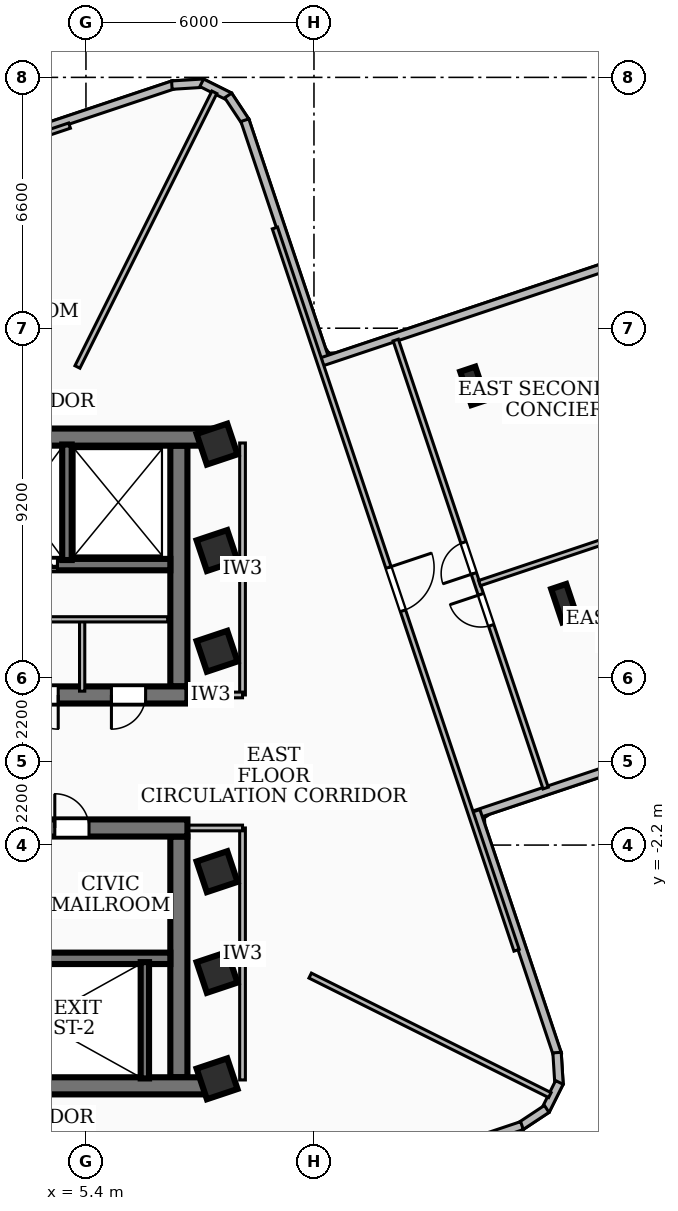
"""IFC4 building model, lengths in metres.
Left out: names, types, materials, properties, quantities, classifications, styles, units other than length and angle.
Written with IfcOpenShell. Run it as: python <this file> out.ifc"""

import sys

from ifc_helpers import new_model, si_unit, direction, frame, frame_2d, origin, origin_2d, place, context, subcontext, project, spatial, rectangle, i_section, extrude, element, fill, save


model = new_model("IFC4")
c1 = context("Model", 3, precision=1e-05, world=origin(), true_north=direction((0.0, 1.0)))
c2 = subcontext(c1, "Body", "Model", "MODEL_VIEW")
j1 = project(units=[si_unit("LENGTHUNIT", "METRE"), si_unit("PLANEANGLEUNIT", "RADIAN")], contexts=[c1])
p1 = place(None, origin())
s1 = spatial("IfcSite", under=j1, at=p1, CompositionType="ELEMENT")
p2 = place(p1, origin())
s2 = spatial("IfcBuilding", under=s1, at=p2, CompositionType="ELEMENT")
p3 = place(p2, frame((0.0, 0.0, 163.08)))
s3 = spatial("IfcBuildingStorey", under=s2, at=p3, CompositionType="ELEMENT", Elevation=163.08)
p4 = place(p3, frame((-8.78, 8.535, 0.0), z_axis=(0.0, 0.0, 1.0), x_axis=(1.0, 0.0, 0.0)))
e1 = element("IfcWall", 1, at=p4, inside=s3, PredefinedType="SHEAR", context=c2, shape_type="SweptSolid", body=[
    extrude(rectangle(XDim=17.56, YDim=0.45, at=frame_2d((8.78, 0.0))), origin(), (0.0, 0.0, 1.0), 3.34),
])
p5 = place(p3, frame((8.07, 1.75, 0.0), z_axis=(0.0, 0.0, 1.0), x_axis=(-1.0, 0.0, 0.0)))
e2 = element("IfcWall", 2, at=p5, inside=s3, PredefinedType="SHEAR", context=c2, shape_type="SweptSolid", body=[
    extrude(rectangle(XDim=16.14, YDim=0.45, at=frame_2d((8.07, 0.0))), origin(), (0.0, 0.0, 1.0), 3.34),
])
p6 = place(p5, frame((7.45, 0.0, 0.0)))
e3 = element("IfcOpeningElement", 3, at=p6, cuts=e2, PredefinedType="OPENING", context=c2, shape_type="SweptSolid", body=[
    extrude(rectangle(XDim=1.0, YDim=2.1, at=frame_2d((0.5, 1.05))), frame((0.0, 0.235, 0.0), z_axis=(0.0, -1.0, 0.0), x_axis=(1.0, 0.0, 0.0)), (0.0, 0.0, 1.0), 0.47),
])
p7 = place(p5, frame((3.4, 0.0, 0.0)))
e4 = element("IfcOpeningElement", 4, at=p7, cuts=e2, PredefinedType="OPENING", context=c2, shape_type="SweptSolid", body=[
    extrude(rectangle(XDim=0.9, YDim=2.06, at=frame_2d((0.45, 1.03))), frame((0.0, 0.235, 0.0), z_axis=(0.0, -1.0, 0.0), x_axis=(1.0, 0.0, 0.0)), (0.0, 0.0, 1.0), 0.47),
])
p8 = place(p5, frame((1.1, 0.0, 0.0)))
e5 = element("IfcOpeningElement", 5, at=p8, cuts=e2, PredefinedType="OPENING", context=c2, shape_type="SweptSolid", body=[
    extrude(rectangle(XDim=0.9, YDim=2.06, at=frame_2d((0.45, 1.03))), frame((0.0, 0.235, 0.0), z_axis=(0.0, -1.0, 0.0), x_axis=(1.0, 0.0, 0.0)), (0.0, 0.0, 1.0), 0.47),
])
p9 = place(p3, frame((7.845, 8.31, 0.0), z_axis=(0.0, 0.0, 1.0), x_axis=(0.0, -1.0, 0.0)))
e6 = element("IfcWall", 6, at=p9, inside=s3, PredefinedType="SHEAR", context=c2, shape_type="SweptSolid", body=[
    extrude(rectangle(XDim=6.335, YDim=0.45, at=frame_2d((3.167, 0.0))), origin(), (0.0, 0.0, 1.0), 3.34),
])
p10 = place(p3, frame((7.62, 5.18, 0.0), z_axis=(0.0, 0.0, 1.0), x_axis=(-1.0, 0.0, 0.0)))
e7 = element("IfcWall", 7, at=p10, inside=s3, PredefinedType="SOLIDWALL", context=c2, shape_type="SweptSolid", body=[
    extrude(rectangle(XDim=15.24, YDim=0.3, at=frame_2d((7.62, 0.0))), origin(), (0.0, 0.0, 1.0), 3.34),
])
p11 = place(p10, frame((5.77, 0.0, 0.0)))
e8 = element("IfcOpeningElement", 8, at=p11, cuts=e7, PredefinedType="OPENING", context=c2, shape_type="SweptSolid", body=[
    extrude(rectangle(XDim=1.1, YDim=2.15, at=frame_2d((0.55, 1.075))), frame((0.0, 0.16, 0.0), z_axis=(0.0, -1.0, 0.0), x_axis=(1.0, 0.0, 0.0)), (0.0, 0.0, 1.0), 0.32),
])
p12 = place(p10, frame((2.97, 0.0, 0.0)))
e9 = element("IfcOpeningElement", 9, at=p12, cuts=e7, PredefinedType="OPENING", context=c2, shape_type="SweptSolid", body=[
    extrude(rectangle(XDim=1.1, YDim=2.15, at=frame_2d((0.55, 1.075))), frame((0.0, 0.16, 0.0), z_axis=(0.0, -1.0, 0.0), x_axis=(1.0, 0.0, 0.0)), (0.0, 0.0, 1.0), 0.32),
])
p13 = place(p10, frame((7.97, 0.0, 0.0)))
e10 = element("IfcOpeningElement", 10, at=p13, cuts=e7, PredefinedType="OPENING", context=c2, shape_type="SweptSolid", body=[
    extrude(rectangle(XDim=1.0, YDim=2.1, at=frame_2d((0.5, 1.05))), frame((0.0, 0.16, 0.0), z_axis=(0.0, -1.0, 0.0), x_axis=(1.0, 0.0, 0.0)), (0.0, 0.0, 1.0), 0.32),
])
p14 = place(p3, frame((8.78, -8.535, 0.0), z_axis=(0.0, 0.0, 1.0), x_axis=(-1.0, 0.0, 0.0)))
e11 = element("IfcWall", 11, at=p14, inside=s3, PredefinedType="SHEAR", context=c2, shape_type="SweptSolid", body=[
    extrude(rectangle(XDim=17.56, YDim=0.45, at=frame_2d((8.78, 0.0))), origin(), (0.0, 0.0, 1.0), 3.34),
])
p15 = place(p3, frame((-8.07, -1.75, 0.0), z_axis=(0.0, 0.0, 1.0), x_axis=(1.0, 0.0, 0.0)))
e12 = element("IfcWall", 12, at=p15, inside=s3, PredefinedType="SHEAR", context=c2, shape_type="SweptSolid", body=[
    extrude(rectangle(XDim=16.14, YDim=0.45, at=frame_2d((8.07, 0.0))), origin(), (0.0, 0.0, 1.0), 3.34),
])
p16 = place(p15, frame((7.45, 0.0, 0.0)))
e13 = element("IfcOpeningElement", 13, at=p16, cuts=e12, PredefinedType="OPENING", context=c2, shape_type="SweptSolid", body=[
    extrude(rectangle(XDim=1.0, YDim=2.1, at=frame_2d((0.5, 1.05))), frame((0.0, 0.235, 0.0), z_axis=(0.0, -1.0, 0.0), x_axis=(1.0, 0.0, 0.0)), (0.0, 0.0, 1.0), 0.47),
])
p17 = place(p15, frame((12.65, 0.0, 0.0)))
e14 = element("IfcOpeningElement", 14, at=p17, cuts=e12, PredefinedType="OPENING", context=c2, shape_type="SweptSolid", body=[
    extrude(rectangle(XDim=0.9, YDim=2.06, at=frame_2d((0.45, 1.03))), frame((0.0, 0.235, 0.0), z_axis=(0.0, -1.0, 0.0), x_axis=(1.0, 0.0, 0.0)), (0.0, 0.0, 1.0), 0.47),
])
p18 = place(p15, frame((0.565, 0.0, 0.0)))
e15 = element("IfcOpeningElement", 15, at=p18, cuts=e12, PredefinedType="OPENING", context=c2, shape_type="SweptSolid", body=[
    extrude(rectangle(XDim=1.05, YDim=2.15, at=frame_2d((0.525, 1.075))), frame((0.0, 0.235, 0.0), z_axis=(0.0, -1.0, 0.0), x_axis=(1.0, 0.0, 0.0)), (0.0, 0.0, 1.0), 0.47),
])
p19 = place(p15, frame((2.125, 0.0, 0.0)))
e16 = element("IfcOpeningElement", 16, at=p19, cuts=e12, PredefinedType="OPENING", context=c2, shape_type="SweptSolid", body=[
    extrude(rectangle(XDim=1.05, YDim=2.15, at=frame_2d((0.525, 1.075))), frame((0.0, 0.235, 0.0), z_axis=(0.0, -1.0, 0.0), x_axis=(1.0, 0.0, 0.0)), (0.0, 0.0, 1.0), 0.47),
])
p20 = place(p15, frame((3.685, 0.0, 0.0)))
e17 = element("IfcOpeningElement", 17, at=p20, cuts=e12, PredefinedType="OPENING", context=c2, shape_type="SweptSolid", body=[
    extrude(rectangle(XDim=1.05, YDim=2.15, at=frame_2d((0.525, 1.075))), frame((0.0, 0.235, 0.0), z_axis=(0.0, -1.0, 0.0), x_axis=(1.0, 0.0, 0.0)), (0.0, 0.0, 1.0), 0.47),
])
p21 = place(p3, frame((7.845, -1.975, 0.0), z_axis=(0.0, 0.0, 1.0), x_axis=(0.0, -1.0, 0.0)))
e18 = element("IfcWall", 18, at=p21, inside=s3, PredefinedType="SHEAR", context=c2, shape_type="SweptSolid", body=[
    extrude(rectangle(XDim=6.335, YDim=0.45, at=frame_2d((3.167, 0.0))), origin(), (0.0, 0.0, 1.0), 3.34),
])
p22 = place(p3, frame((-7.62, -5.18, 0.0), z_axis=(0.0, 0.0, 1.0), x_axis=(1.0, 0.0, 0.0)))
e19 = element("IfcWall", 19, at=p22, inside=s3, PredefinedType="SOLIDWALL", context=c2, shape_type="SweptSolid", body=[
    extrude(rectangle(XDim=15.24, YDim=0.3, at=frame_2d((7.62, 0.0))), origin(), (0.0, 0.0, 1.0), 3.34),
])
p23 = place(p22, frame((5.77, 0.0, 0.0)))
e20 = element("IfcOpeningElement", 20, at=p23, cuts=e19, PredefinedType="OPENING", context=c2, shape_type="SweptSolid", body=[
    extrude(rectangle(XDim=1.1, YDim=2.15, at=frame_2d((0.55, 1.075))), frame((0.0, 0.16, 0.0), z_axis=(0.0, -1.0, 0.0), x_axis=(1.0, 0.0, 0.0)), (0.0, 0.0, 1.0), 0.32),
])
p24 = place(p22, frame((7.97, 0.0, 0.0)))
e21 = element("IfcOpeningElement", 21, at=p24, cuts=e19, PredefinedType="OPENING", context=c2, shape_type="SweptSolid", body=[
    extrude(rectangle(XDim=1.0, YDim=2.1, at=frame_2d((0.5, 1.05))), frame((0.0, 0.16, 0.0), z_axis=(0.0, -1.0, 0.0), x_axis=(1.0, 0.0, 0.0)), (0.0, 0.0, 1.0), 0.32),
])
p25 = place(p3, frame((6.95, -8.34, 0.0), z_axis=(0.0, 0.0, 1.0), x_axis=(0.0, 1.0, 0.0)))
e22 = element("IfcWall", 22, at=p25, inside=s3, PredefinedType="SOLIDWALL", context=c2, shape_type="SweptSolid", body=[
    extrude(rectangle(XDim=3.06, YDim=0.22, at=frame_2d((1.53, 0.0))), origin(), (0.0, 0.0, 1.0), 3.34),
])
p26 = place(p3, frame((4.9, 5.3, 0.0), z_axis=(0.0, 0.0, 1.0), x_axis=(0.0, 1.0, 0.0)))
e23 = element("IfcWall", 23, at=p26, inside=s3, PredefinedType="SOLIDWALL", context=c2, shape_type="SweptSolid", body=[
    extrude(rectangle(XDim=3.04, YDim=0.25, at=frame_2d((1.52, 0.0))), origin(), (0.0, 0.0, 1.0), 3.34),
])
for number, where, z_axis, x_axis in (
    (24, (8.85, -5.55, 0.0), (0.0, 0.0, 1.0), (0.948, 0.317, 0.0)),
    (25, (8.85, -2.9, 0.0), (0.0, 0.0, 1.0), (0.948, 0.317, 0.0)),
    (26, (8.85, 2.9, 0.0), (0.0, 0.0, 1.0), (0.948, 0.317, 0.0)),
    (27, (8.85, 5.55, 0.0), (0.0, 0.0, 1.0), (0.948, 0.317, 0.0)),
    (28, (8.85, -8.35, 0.0), (0.0, 0.0, 1.0), (0.948, 0.317, 0.0)),
    (29, (8.85, 8.35, 0.0), (0.0, 0.0, 1.0), (0.948, 0.317, 0.0)),
):
    element("IfcColumn", number, at=place(p3, frame(where, z_axis=z_axis, x_axis=x_axis)), inside=s3, PredefinedType="COLUMN", context=c2, shape_type="SweptSolid", body=[
        extrude(rectangle(XDim=0.85, YDim=0.85, at=origin_2d()), origin(), (0.0, 0.0, 1.0), 3.6),
    ])
for number, where, z_axis, x_axis in (
    (30, (17.987, 4.164, 0.0), (0.0, 0.0, 1.0), (0.948, 0.317, 0.0)),
    (31, (15.594, 9.883, 0.0), (0.0, 0.0, 1.0), (0.948, 0.317, 0.0)),
):
    element("IfcColumn", number, at=place(p3, frame(where, z_axis=z_axis, x_axis=x_axis)), inside=s3, PredefinedType="COLUMN", context=c2, shape_type="SweptSolid", body=[
        extrude(i_section(OverallWidth=0.418, OverallDepth=0.927, WebThickness=0.019, FlangeThickness=0.032, at=origin_2d()), origin(), (0.0, 0.0, 1.0), 3.6),
    ])
p27 = place(p3, frame((1.3, 15.662, 0.0), z_axis=(0.0, 0.0, 1.0), x_axis=(0.948350412494, 0.317224676093, 0.0)))
e32 = element("IfcWall", 32, at=p27, inside=s3, PredefinedType="SOLIDWALL", context=c2, shape_type="SweptSolid", body=[
    extrude(rectangle(XDim=6.758, YDim=0.22, at=frame_2d((3.379, 0.0))), origin(), (0.0, 0.0, 1.0), 2.644),
])
p28 = place(p3, frame((7.66, 17.796, 0.0), z_axis=(0.0, 0.0, 1.0), x_axis=(0.998057128569, 0.062305442082, 0.0)))
e33 = element("IfcWall", 33, at=p28, inside=s3, PredefinedType="SOLIDWALL", context=c2, shape_type="SweptSolid", body=[
    extrude(rectangle(XDim=0.835, YDim=0.22, at=frame_2d((0.417, 0.0))), origin(), (0.0, 0.0, 1.0), 3.34),
])
p29 = place(p3, frame((8.446, 17.857, 0.0), z_axis=(0.0, 0.0, 1.0), x_axis=(0.894904281631, -0.446258139106, 0.0)))
e34 = element("IfcWall", 34, at=p29, inside=s3, PredefinedType="SOLIDWALL", context=c2, shape_type="SweptSolid", body=[
    extrude(rectangle(XDim=0.818, YDim=0.22, at=frame_2d((0.409, 0.0))), origin(), (0.0, 0.0, 1.0), 3.34),
])
p30 = place(p3, frame((9.142, 17.524, 0.0), z_axis=(0.0, 0.0, 1.0), x_axis=(0.552133058206, -0.833756011094, 0.0)))
e35 = element("IfcWall", 35, at=p30, inside=s3, PredefinedType="SOLIDWALL", context=c2, shape_type="SweptSolid", body=[
    extrude(rectangle(XDim=0.835, YDim=0.22, at=frame_2d((0.417, 0.0))), origin(), (0.0, 0.0, 1.0), 3.34),
])
p31 = place(p3, frame((9.581, 16.873, 0.0), z_axis=(0.0, 0.0, 1.0), x_axis=(0.317387116224, -0.94829606055, 0.0)))
e36 = element("IfcWall", 36, at=p31, inside=s3, PredefinedType="SOLIDWALL", context=c2, shape_type="SweptSolid", body=[
    extrude(rectangle(XDim=6.758, YDim=0.22, at=frame_2d((3.379, 0.0))), origin(), (0.0, 0.0, 1.0), 2.644),
])
p32 = place(p3, frame((11.615, 10.519, 0.0), z_axis=(0.0, 0.0, 1.0), x_axis=(0.948331055834, 0.317282537404, 0.0)))
e37 = element("IfcWall", 37, at=p32, inside=s3, PredefinedType="SOLIDWALL", context=c2, shape_type="SweptSolid", body=[
    extrude(rectangle(XDim=9.858, YDim=0.22, at=frame_2d((4.929, 0.0))), origin(), (0.0, 0.0, 1.0), 2.644),
])
p33 = place(p3, frame((24.956, 1.717, 0.0), z_axis=(0.0, 0.0, 1.0), x_axis=(-0.948331055834, -0.317282537404, 0.0)))
e38 = element("IfcWall", 38, at=p33, inside=s3, PredefinedType="SOLIDWALL", context=c2, shape_type="SweptSolid", body=[
    extrude(rectangle(XDim=9.858, YDim=0.22, at=frame_2d((4.929, 0.0))), origin(), (0.0, 0.0, 1.0), 3.34),
])
p34 = place(p33, frame((0.85, 0.0, 0.85)))
e39 = element("IfcOpeningElement", 39, at=p34, cuts=e38, PredefinedType="OPENING", context=c2, shape_type="SweptSolid", body=[
    extrude(rectangle(XDim=2.7, YDim=1.85, at=frame_2d((1.35, 0.925))), frame((0.0, 0.12, 0.0), z_axis=(0.0, -1.0, 0.0), x_axis=(1.0, 0.0, 0.0)), (0.0, 0.0, 1.0), 0.24),
])
p35 = place(p3, frame((15.662, -1.3, 0.0), z_axis=(0.0, 0.0, 1.0), x_axis=(0.317224676093, -0.948350412494, 0.0)))
e40 = element("IfcWall", 40, at=p35, inside=s3, PredefinedType="SOLIDWALL", context=c2, shape_type="SweptSolid", body=[
    extrude(rectangle(XDim=6.758, YDim=0.22, at=frame_2d((3.379, 0.0))), origin(), (0.0, 0.0, 1.0), 3.34),
])
p36 = place(p3, frame((17.796, -7.66, 0.0), z_axis=(0.0, 0.0, 1.0), x_axis=(0.062305442082, -0.998057128569, 0.0)))
e41 = element("IfcWall", 41, at=p36, inside=s3, PredefinedType="SOLIDWALL", context=c2, shape_type="SweptSolid", body=[
    extrude(rectangle(XDim=0.835, YDim=0.22, at=frame_2d((0.417, 0.0))), origin(), (0.0, 0.0, 1.0), 3.34),
])
p37 = place(p3, frame((17.857, -8.446, 0.0), z_axis=(0.0, 0.0, 1.0), x_axis=(-0.446258139106, -0.894904281631, 0.0)))
e42 = element("IfcWall", 42, at=p37, inside=s3, PredefinedType="SOLIDWALL", context=c2, shape_type="SweptSolid", body=[
    extrude(rectangle(XDim=0.818, YDim=0.22, at=frame_2d((0.409, 0.0))), origin(), (0.0, 0.0, 1.0), 3.34),
])
p38 = place(p3, frame((17.524, -9.142, 0.0), z_axis=(0.0, 0.0, 1.0), x_axis=(-0.833756011094, -0.552133058206, 0.0)))
e43 = element("IfcWall", 43, at=p38, inside=s3, PredefinedType="SOLIDWALL", context=c2, shape_type="SweptSolid", body=[
    extrude(rectangle(XDim=0.835, YDim=0.22, at=frame_2d((0.417, 0.0))), origin(), (0.0, 0.0, 1.0), 3.34),
])
p39 = place(p3, frame((16.873, -9.581, 0.0), z_axis=(0.0, 0.0, 1.0), x_axis=(-0.94829606055, -0.317387116224, 0.0)))
e44 = element("IfcWall", 44, at=p39, inside=s3, PredefinedType="SOLIDWALL", context=c2, shape_type="SweptSolid", body=[
    extrude(rectangle(XDim=6.758, YDim=0.22, at=frame_2d((3.379, 0.0))), origin(), (0.0, 0.0, 1.0), 3.34),
])
p40 = place(p3, frame((2.9, 3.74, 0.0), z_axis=(0.0, 0.0, 1.0), x_axis=(1.0, 0.0, 0.0)))
e45 = element("IfcWall", 45, at=p40, inside=s3, PredefinedType="PARTITIONING", context=c2, shape_type="SweptSolid", body=[
    extrude(rectangle(XDim=4.65, YDim=0.138, at=frame_2d((2.325, 0.0))), origin(), (0.0, 0.0, 1.0), 3.34),
])
p41 = place(p3, frame((5.3, 1.85, 0.0), z_axis=(0.0, 0.0, 1.0), x_axis=(0.0, 1.0, 0.0)))
e46 = element("IfcWall", 46, at=p41, inside=s3, PredefinedType="PARTITIONING", context=c2, shape_type="SweptSolid", body=[
    extrude(rectangle(XDim=1.89, YDim=0.138, at=frame_2d((0.945, 0.0))), origin(), (0.0, 0.0, 1.0), 2.57),
])
p42 = place(p3, frame((9.52, 1.75, 0.0), z_axis=(0.0, 0.0, 1.0), x_axis=(0.0, 1.0, 0.0)))
e47 = element("IfcWall", 47, at=p42, inside=s3, PredefinedType="PARTITIONING", context=c2, shape_type="SweptSolid", body=[
    extrude(rectangle(XDim=6.63, YDim=0.15, at=frame_2d((3.315, 0.0))), origin(), (0.0, 0.0, 1.0), 2.644),
])
p43 = place(p3, frame((7.85, 1.75, 0.0), z_axis=(0.0, 0.0, 1.0), x_axis=(1.0, 0.0, 0.0)))
e48 = element("IfcWall", 48, at=p43, inside=s3, PredefinedType="PARTITIONING", context=c2, shape_type="SweptSolid", body=[
    extrude(rectangle(XDim=1.67, YDim=0.15, at=frame_2d((0.835, 0.0))), origin(), (0.0, 0.0, 1.0), 2.57),
])
p44 = place(p3, frame((9.52, -8.38, 0.0), z_axis=(0.0, 0.0, 1.0), x_axis=(0.0, 1.0, 0.0)))
e49 = element("IfcWall", 49, at=p44, inside=s3, PredefinedType="PARTITIONING", context=c2, shape_type="SweptSolid", body=[
    extrude(rectangle(XDim=6.63, YDim=0.15, at=frame_2d((3.315, 0.0))), origin(), (0.0, 0.0, 1.0), 3.34),
])
p45 = place(p3, frame((7.85, -1.75, 0.0), z_axis=(0.0, 0.0, 1.0), x_axis=(1.0, 0.0, 0.0)))
e50 = element("IfcWall", 50, at=p45, inside=s3, PredefinedType="PARTITIONING", context=c2, shape_type="SweptSolid", body=[
    extrude(rectangle(XDim=1.67, YDim=0.15, at=frame_2d((0.835, 0.0))), origin(), (0.0, 0.0, 1.0), 2.57),
])
p46 = place(p3, frame((5.176, 10.38, 0.0), z_axis=(0.0, 0.0, 1.0), x_axis=(0.446173290391, 0.894946587759, 0.0)))
e51 = element("IfcWall", 51, at=p46, inside=s3, PredefinedType="PARTITIONING", context=c2, shape_type="SweptSolid", body=[
    extrude(rectangle(XDim=8.075, YDim=0.145, at=frame_2d((4.038, 0.0))), origin(), (0.0, 0.0, 1.0), 2.644),
])
p47 = place(p3, frame((11.3, -5.634, 0.0), z_axis=(0.0, 0.0, 1.0), x_axis=(0.894904738475, -0.446257222972, 0.0)))
e52 = element("IfcWall", 52, at=p47, inside=s3, PredefinedType="PARTITIONING", context=c2, shape_type="SweptSolid", body=[
    extrude(rectangle(XDim=7.048, YDim=0.145, at=frame_2d((3.524, 0.0))), origin(), (0.0, 0.0, 1.0), 3.34),
])
p48 = place(p3, frame((10.372, 14.037, 0.0), z_axis=(0.0, 0.0, 1.0), x_axis=(0.317298382655, -0.94832575435, 0.0)))
e53 = element("IfcWall", 53, at=p48, inside=s3, PredefinedType="PARTITIONING", context=c2, shape_type="SweptSolid", body=[
    extrude(rectangle(XDim=20.041, YDim=0.145, at=frame_2d((10.021, 0.0))), origin(), (0.0, 0.0, 1.0), 2.644),
])
p49 = place(p48, frame((9.42, 0.0, 0.0)))
e54 = element("IfcOpeningElement", 54, at=p49, cuts=e53, PredefinedType="OPENING", context=c2, shape_type="SweptSolid", body=[
    extrude(rectangle(XDim=1.2, YDim=2.1, at=frame_2d((0.6, 1.05))), frame((0.0, 0.083, 0.0), z_axis=(0.0, -1.0, 0.0), x_axis=(1.0, 0.0, 0.0)), (0.0, 0.0, 1.0), 0.165),
])
p50 = place(p3, frame((15.755, 4.692, 0.0), z_axis=(0.0, 0.0, 1.0), x_axis=(0.94831322287, 0.317335833667, 0.0)))
e55 = element("IfcWall", 55, at=p50, inside=s3, PredefinedType="PARTITIONING", context=c2, shape_type="SweptSolid", body=[
    extrude(rectangle(XDim=9.186, YDim=0.145, at=frame_2d((4.593, 0.0))), origin(), (0.0, 0.0, 1.0), 2.793),
])
p51 = place(p3, frame((17.496, -0.7, 0.0), z_axis=(0.0, 0.0, 1.0), x_axis=(-0.317299961245, 0.948325226172, 0.0)))
e56 = element("IfcWall", 56, at=p51, inside=s3, PredefinedType="PARTITIONING", context=c2, shape_type="SweptSolid", body=[
    extrude(rectangle(XDim=12.43, YDim=0.145, at=frame_2d((6.215, 0.0))), origin(), (0.0, 0.0, 1.0), 2.644),
])
p52 = place(p51, frame((4.515, 0.0, 0.0)))
e57 = element("IfcOpeningElement", 57, at=p52, cuts=e56, PredefinedType="OPENING", context=c2, shape_type="SweptSolid", body=[
    extrude(rectangle(XDim=0.86, YDim=2.04, at=frame_2d((0.43, 1.02))), frame((0.0, 0.083, 0.0), z_axis=(0.0, -1.0, 0.0), x_axis=(1.0, 0.0, 0.0)), (0.0, 0.0, 1.0), 0.165),
])
p53 = place(p51, frame((5.955, 0.0, 0.0)))
e58 = element("IfcOpeningElement", 58, at=p53, cuts=e56, PredefinedType="OPENING", context=c2, shape_type="SweptSolid", body=[
    extrude(rectangle(XDim=0.86, YDim=2.04, at=frame_2d((0.43, 1.02))), frame((0.0, 0.083, 0.0), z_axis=(0.0, -1.0, 0.0), x_axis=(1.0, 0.0, 0.0)), (0.0, 0.0, 1.0), 0.165),
])
p54 = place(p3, frame((-14.037, 10.372, 0.0), z_axis=(0.0, 0.0, 1.0), x_axis=(0.94832575435, 0.317298382655, 0.0)))
e59 = element("IfcWall", 59, at=p54, inside=s3, PredefinedType="PARTITIONING", context=c2, shape_type="SweptSolid", body=[
    extrude(rectangle(XDim=20.041, YDim=0.145, at=frame_2d((10.021, 0.0))), origin(), (0.0, 0.0, 1.0), 2.644),
])
p55 = place(p54, frame((9.42, 0.0, 0.0)))
e60 = element("IfcOpeningElement", 60, at=p55, cuts=e59, PredefinedType="OPENING", context=c2, shape_type="SweptSolid", body=[
    extrude(rectangle(XDim=1.2, YDim=2.1, at=frame_2d((0.6, 1.05))), frame((0.0, 0.083, 0.0), z_axis=(0.0, -1.0, 0.0), x_axis=(1.0, 0.0, 0.0)), (0.0, 0.0, 1.0), 0.165),
])
p56 = place(p12, origin())
e61 = element("IfcDoor", 61, at=p56, inside=s3, OperationType="DOUBLE_DOOR_SLIDING", PredefinedType="DOOR", context=c2, shape_type="SweptSolid", body=[
    extrude(rectangle(XDim=1.1, YDim=2.15, at=frame_2d((0.55, 1.075))), frame((0.0, 0.025, 0.0), z_axis=(0.0, -1.0, 0.0), x_axis=(1.0, 0.0, 0.0)), (0.0, 0.0, 1.0), 0.05),
])
fill(e9, e61)
p57 = place(p17, origin())
e62 = element("IfcDoor", 62, at=p57, inside=s3, OperationType="SINGLE_SWING_LEFT", PredefinedType="DOOR", context=c2, shape_type="SweptSolid", body=[
    extrude(rectangle(XDim=0.9, YDim=2.06, at=frame_2d((0.45, 1.03))), frame((0.0, 0.025, 0.0), z_axis=(0.0, -1.0, 0.0), x_axis=(1.0, 0.0, 0.0)), (0.0, 0.0, 1.0), 0.05),
])
fill(e14, e62)
p58 = place(p7, origin())
e63 = element("IfcDoor", 63, at=p58, inside=s3, OperationType="SINGLE_SWING_LEFT", PredefinedType="DOOR", context=c2, shape_type="SweptSolid", body=[
    extrude(rectangle(XDim=0.9, YDim=2.06, at=frame_2d((0.45, 1.03))), frame((0.0, 0.025, 0.0), z_axis=(0.0, -1.0, 0.0), x_axis=(1.0, 0.0, 0.0)), (0.0, 0.0, 1.0), 0.05),
])
fill(e4, e63)
p59 = place(p8, origin())
e64 = element("IfcDoor", 64, at=p59, inside=s3, OperationType="SINGLE_SWING_RIGHT", PredefinedType="DOOR", context=c2, shape_type="SweptSolid", body=[
    extrude(rectangle(XDim=0.9, YDim=2.06, at=frame_2d((0.45, 1.03))), frame((0.0, 0.025, 0.0), z_axis=(0.0, -1.0, 0.0), x_axis=(1.0, 0.0, 0.0)), (0.0, 0.0, 1.0), 0.05),
])
fill(e5, e64)
p60 = place(p49, origin())
e65 = element("IfcDoor", 65, at=p60, inside=s3, OperationType="SINGLE_SWING_LEFT", PredefinedType="DOOR", context=c2, shape_type="SweptSolid", body=[
    extrude(rectangle(XDim=1.2, YDim=2.1, at=frame_2d((0.6, 1.05))), frame((0.0, 0.025, 0.0), z_axis=(0.0, -1.0, 0.0), x_axis=(1.0, 0.0, 0.0)), (0.0, 0.0, 1.0), 0.05),
])
fill(e54, e65)
p61 = place(p52, origin())
e66 = element("IfcDoor", 66, at=p61, inside=s3, OperationType="SINGLE_SWING_RIGHT", PredefinedType="DOOR", context=c2, shape_type="SweptSolid", body=[
    extrude(rectangle(XDim=0.86, YDim=2.04, at=frame_2d((0.43, 1.02))), frame((0.0, 0.025, 0.0), z_axis=(0.0, -1.0, 0.0), x_axis=(1.0, 0.0, 0.0)), (0.0, 0.0, 1.0), 0.05),
])
fill(e57, e66)
p62 = place(p53, origin())
e67 = element("IfcDoor", 67, at=p62, inside=s3, OperationType="SINGLE_SWING_LEFT", PredefinedType="DOOR", context=c2, shape_type="SweptSolid", body=[
    extrude(rectangle(XDim=0.86, YDim=2.04, at=frame_2d((0.43, 1.02))), frame((0.0, 0.025, 0.0), z_axis=(0.0, -1.0, 0.0), x_axis=(1.0, 0.0, 0.0)), (0.0, 0.0, 1.0), 0.05),
])
fill(e58, e67)
save(model, sys.argv[1])
